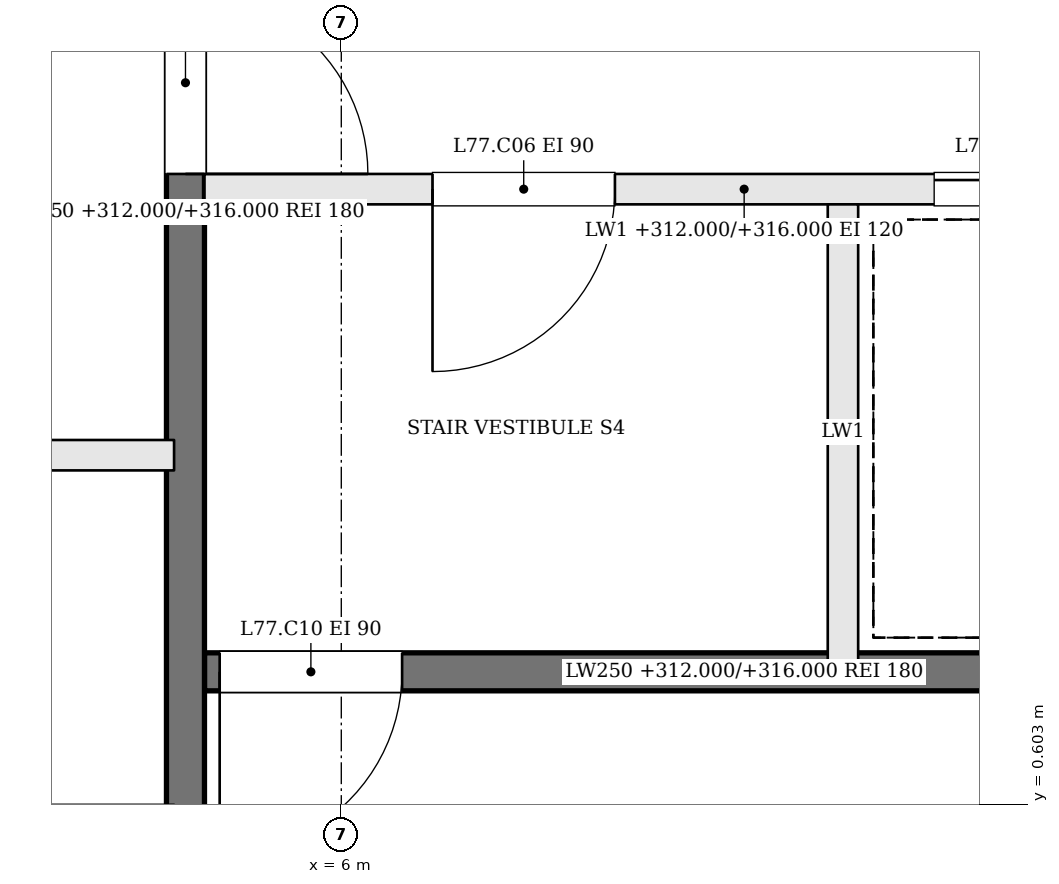
"""IFC4 building model, lengths in metres.
Left out: names, types, materials, properties, quantities, classifications, styles, units other than length and angle.
Written with IfcOpenShell. Run it as: python <this file> out.ifc"""

import sys

from ifc_helpers import new_model, si_unit, direction, frame, frame_2d, origin, place, context, subcontext, project, spatial, rectangle, extrude, element, fill, save


model = new_model("IFC4")
c1 = context("Model", 3, precision=1e-05, world=origin(), true_north=direction((0.0, 1.0)))
c2 = subcontext(c1, "Body", "Model", "MODEL_VIEW")
j1 = project(units=[si_unit("LENGTHUNIT", "METRE"), si_unit("PLANEANGLEUNIT", "RADIAN")], contexts=[c1])
p1 = place(None, origin())
s1 = spatial("IfcSite", under=j1, at=p1, CompositionType="ELEMENT")
p2 = place(p1, origin())
s2 = spatial("IfcBuilding", under=s1, at=p2, CompositionType="ELEMENT")
p3 = place(p2, frame((0.0, 0.0, 312.0)))
s3 = spatial("IfcBuildingStorey", under=s2, at=p3, CompositionType="ELEMENT", Elevation=312.0)
p4 = place(p3, frame((12.2, 4.65, 0.0), z_axis=(0.0, 0.0, 1.0), x_axis=(-1.0, 0.0, 0.0)))
e1 = element("IfcWall", 1, at=p4, inside=s3, PredefinedType="SOLIDWALL", context=c2, shape_type="SweptSolid", body=[
    extrude(rectangle(XDim=7.1, YDim=0.2, at=frame_2d((3.55, 0.0))), origin(), (0.0, 0.0, 1.0), 4.0),
])
p5 = place(p4, frame((4.4, 0.0, 0.0)))
e2 = element("IfcOpeningElement", 2, at=p5, cuts=e1, PredefinedType="OPENING", context=c2, shape_type="SweptSolid", body=[
    extrude(rectangle(XDim=1.2, YDim=2.1, at=frame_2d((0.6, 1.05))), frame((0.0, 0.11, 0.0), z_axis=(0.0, -1.0, 0.0), x_axis=(1.0, 0.0, 0.0)), (0.0, 0.0, 1.0), 0.22),
])
p6 = place(p4, frame((1.1, 0.0, 0.0)))
e3 = element("IfcOpeningElement", 3, at=p6, cuts=e1, PredefinedType="OPENING", context=c2, shape_type="SweptSolid", body=[
    extrude(rectangle(XDim=1.2, YDim=2.1, at=frame_2d((0.6, 1.05))), frame((0.0, 0.11, 0.0), z_axis=(0.0, -1.0, 0.0), x_axis=(1.0, 0.0, 0.0)), (0.0, 0.0, 1.0), 0.22),
])
p7 = place(p3, frame((12.2, 1.475, 0.0), z_axis=(0.0, 0.0, 1.0), x_axis=(-1.0, 0.0, 0.0)))
e4 = element("IfcWall", 4, at=p7, inside=s3, PredefinedType="SOLIDWALL", context=c2, shape_type="SweptSolid", body=[
    extrude(rectangle(XDim=7.1, YDim=0.25, at=frame_2d((3.55, 0.0))), origin(), (0.0, 0.0, 1.0), 4.0),
])
p8 = place(p7, frame((5.8, 0.0, 0.0)))
e5 = element("IfcOpeningElement", 5, at=p8, cuts=e4, PredefinedType="OPENING", context=c2, shape_type="SweptSolid", body=[
    extrude(rectangle(XDim=1.2, YDim=2.1, at=frame_2d((0.6, 1.05))), frame((0.0, 0.135, 0.0), z_axis=(0.0, -1.0, 0.0), x_axis=(1.0, 0.0, 0.0)), (0.0, 0.0, 1.0), 0.27),
])
p9 = place(p3, frame((9.3, 4.55, 0.0), z_axis=(0.0, 0.0, 1.0), x_axis=(0.0, -1.0, 0.0)))
e6 = element("IfcWall", 6, at=p9, inside=s3, PredefinedType="SOLIDWALL", context=c2, shape_type="SweptSolid", body=[
    extrude(rectangle(XDim=3.0, YDim=0.2, at=frame_2d((1.5, 0.0))), origin(), (0.0, 0.0, 1.0), 4.0),
])
p10 = place(p3, frame((4.975, 11.2, 0.0), z_axis=(0.0, 0.0, 1.0), x_axis=(0.0, -1.0, 0.0)))
e7 = element("IfcWall", 7, at=p10, inside=s3, PredefinedType="SOLIDWALL", context=c2, shape_type="SweptSolid", body=[
    extrude(rectangle(XDim=13.4, YDim=0.25, at=frame_2d((6.7, 0.0))), origin(), (0.0, 0.0, 1.0), 4.0),
])
p11 = place(p10, frame((5.25, 0.0, 0.0)))
e8 = element("IfcOpeningElement", 8, at=p11, cuts=e7, PredefinedType="OPENING", context=c2, shape_type="SweptSolid", body=[
    extrude(rectangle(XDim=1.2, YDim=2.1, at=frame_2d((0.6, 1.05))), frame((0.0, 0.135, 0.0), z_axis=(0.0, -1.0, 0.0), x_axis=(1.0, 0.0, 0.0)), (0.0, 0.0, 1.0), 0.27),
])
p12 = place(p3, frame((-4.9, 2.9, 0.0), z_axis=(0.0, 0.0, 1.0), x_axis=(1.0, 0.0, 0.0)))
e9 = element("IfcWall", 9, at=p12, inside=s3, PredefinedType="SOLIDWALL", context=c2, shape_type="SweptSolid", body=[
    extrude(rectangle(XDim=9.8, YDim=0.2, at=frame_2d((4.9, 0.0))), origin(), (0.0, 0.0, 1.0), 4.0),
])
p13 = place(p12, frame((0.725, 0.0, 0.0)))
e10 = element("IfcOpeningElement", 10, at=p13, cuts=e9, PredefinedType="OPENING", context=c2, shape_type="SweptSolid", body=[
    extrude(rectangle(XDim=1.0, YDim=2.1, at=frame_2d((0.5, 1.05))), frame((0.0, 0.11, 0.0), z_axis=(0.0, -1.0, 0.0), x_axis=(1.0, 0.0, 0.0)), (0.0, 0.0, 1.0), 0.22),
])
p14 = place(p12, frame((3.175, 0.0, 0.0)))
e11 = element("IfcOpeningElement", 11, at=p14, cuts=e9, PredefinedType="OPENING", context=c2, shape_type="SweptSolid", body=[
    extrude(rectangle(XDim=1.0, YDim=2.1, at=frame_2d((0.5, 1.05))), frame((0.0, 0.11, 0.0), z_axis=(0.0, -1.0, 0.0), x_axis=(1.0, 0.0, 0.0)), (0.0, 0.0, 1.0), 0.22),
])
p15 = place(p12, frame((7.463, 0.0, 0.0)))
e12 = element("IfcOpeningElement", 12, at=p15, cuts=e9, PredefinedType="OPENING", context=c2, shape_type="SweptSolid", body=[
    extrude(rectangle(XDim=1.0, YDim=2.1, at=frame_2d((0.5, 1.05))), frame((0.0, 0.11, 0.0), z_axis=(0.0, -1.0, 0.0), x_axis=(1.0, 0.0, 0.0)), (0.0, 0.0, 1.0), 0.22),
])
p16 = place(p11, origin())
e13 = element("IfcDoor", 13, at=p16, inside=s3, OperationType="SINGLE_SWING_RIGHT", PredefinedType="DOOR", context=c2, shape_type="SweptSolid", body=[
    extrude(rectangle(XDim=1.2, YDim=2.1, at=frame_2d((0.6, 1.05))), frame((0.0, 0.025, 0.0), z_axis=(0.0, -1.0, 0.0), x_axis=(1.0, 0.0, 0.0)), (0.0, 0.0, 1.0), 0.05),
])
fill(e8, e13)
p17 = place(p5, origin())
e14 = element("IfcDoor", 14, at=p17, inside=s3, OperationType="SINGLE_SWING_RIGHT", PredefinedType="DOOR", context=c2, shape_type="SweptSolid", body=[
    extrude(rectangle(XDim=1.2, YDim=2.1, at=frame_2d((0.6, 1.05))), frame((0.0, 0.025, 0.0), z_axis=(0.0, -1.0, 0.0), x_axis=(1.0, 0.0, 0.0)), (0.0, 0.0, 1.0), 0.05),
])
fill(e2, e14)
p18 = place(p8, origin())
e15 = element("IfcDoor", 15, at=p18, inside=s3, OperationType="SINGLE_SWING_RIGHT", PredefinedType="DOOR", context=c2, shape_type="SweptSolid", body=[
    extrude(rectangle(XDim=1.2, YDim=2.1, at=frame_2d((0.6, 1.05))), frame((0.0, 0.025, 0.0), z_axis=(0.0, -1.0, 0.0), x_axis=(1.0, 0.0, 0.0)), (0.0, 0.0, 1.0), 0.05),
])
fill(e5, e15)
p19 = place(p6, origin())
e16 = element("IfcDoor", 16, at=p19, inside=s3, OperationType="SLIDING_TO_RIGHT", PredefinedType="DOOR", context=c2, shape_type="SweptSolid", body=[
    extrude(rectangle(XDim=1.2, YDim=2.1, at=frame_2d((0.6, 1.05))), frame((0.0, 0.025, 0.0), z_axis=(0.0, -1.0, 0.0), x_axis=(1.0, 0.0, 0.0)), (0.0, 0.0, 1.0), 0.05),
])
fill(e3, e16)
save(model, sys.argv[1])
